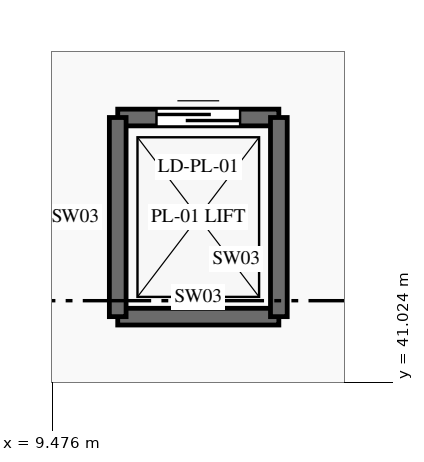
"""IFC4 building model, lengths in metres.
Left out: names, types, materials, properties, quantities, classifications, styles, units other than length and angle.
Written with IfcOpenShell. Run it as: python <this file> out.ifc"""

import sys

from ifc_helpers import new_model, si_unit, direction, frame, frame_2d, origin, place, context, subcontext, project, spatial, rectangle, extrude, element, fill, save


model = new_model("IFC4")
c1 = context("Model", 3, precision=1e-05, world=origin(), true_north=direction((0.0, 1.0)))
c2 = subcontext(c1, "Body", "Model", "MODEL_VIEW")
j1 = project(units=[si_unit("LENGTHUNIT", "METRE"), si_unit("PLANEANGLEUNIT", "RADIAN")], contexts=[c1])
p1 = place(None, origin())
s1 = spatial("IfcSite", under=j1, at=p1, CompositionType="ELEMENT")
p2 = place(p1, origin())
s2 = spatial("IfcBuilding", under=s1, at=p2, CompositionType="ELEMENT")
p3 = place(p2, origin())
s3 = spatial("IfcBuildingStorey", under=s2, at=p3, CompositionType="ELEMENT", Elevation=0.0)
p4 = place(p3, frame((10.34, 41.89, 0.0), z_axis=(0.0, 0.0, 1.0), x_axis=(1.0, 0.0, 0.0)))
e1 = element("IfcWall", 1, at=p4, inside=s3, PredefinedType="SHEAR", context=c2, shape_type="SweptSolid", body=[
    extrude(rectangle(XDim=2.12, YDim=0.22, at=frame_2d((1.06, 0.0))), origin(), (0.0, 0.0, 1.0), 6.0),
])
p5 = place(p3, frame((10.34, 44.51, 0.0), z_axis=(0.0, 0.0, 1.0), x_axis=(1.0, 0.0, 0.0)))
e2 = element("IfcWall", 2, at=p5, inside=s3, PredefinedType="SHEAR", context=c2, shape_type="SweptSolid", body=[
    extrude(rectangle(XDim=2.12, YDim=0.22, at=frame_2d((1.06, 0.0))), origin(), (0.0, 0.0, 1.0), 6.0),
])
p6 = place(p5, frame((0.51, 0.0, 0.0)))
e3 = element("IfcOpeningElement", 3, at=p6, cuts=e2, PredefinedType="OPENING", context=c2, shape_type="SweptSolid", body=[
    extrude(rectangle(XDim=1.1, YDim=2.15, at=frame_2d((0.55, 1.075))), frame((0.0, 0.125, 0.0), z_axis=(0.0, -1.0, 0.0), x_axis=(1.0, 0.0, 0.0)), (0.0, 0.0, 1.0), 0.25),
])
for number, where, z_axis, x_axis in (
    (4, (10.34, 41.89, 0.0), (0.0, 0.0, 1.0), (0.0, 1.0, 0.0)),
    (5, (12.46, 41.89, 0.0), (0.0, 0.0, 1.0), (0.0, 1.0, 0.0)),
):
    element("IfcWall", number, at=place(p3, frame(where, z_axis=z_axis, x_axis=x_axis)), inside=s3, PredefinedType="SHEAR", context=c2, shape_type="SweptSolid", body=[
        extrude(rectangle(XDim=2.62, YDim=0.22, at=frame_2d((1.31, 0.0))), origin(), (0.0, 0.0, 1.0), 6.0),
    ])
p7 = place(p6, origin())
e6 = element("IfcDoor", 6, at=p7, inside=s3, OperationType="SLIDING_TO_LEFT", PredefinedType="DOOR", context=c2, shape_type="SweptSolid", body=[
    extrude(rectangle(XDim=1.1, YDim=2.15, at=frame_2d((0.55, 1.075))), frame((0.0, 0.025, 0.0), z_axis=(0.0, -1.0, 0.0), x_axis=(1.0, 0.0, 0.0)), (0.0, 0.0, 1.0), 0.05),
])
fill(e3, e6)
save(model, sys.argv[1])
